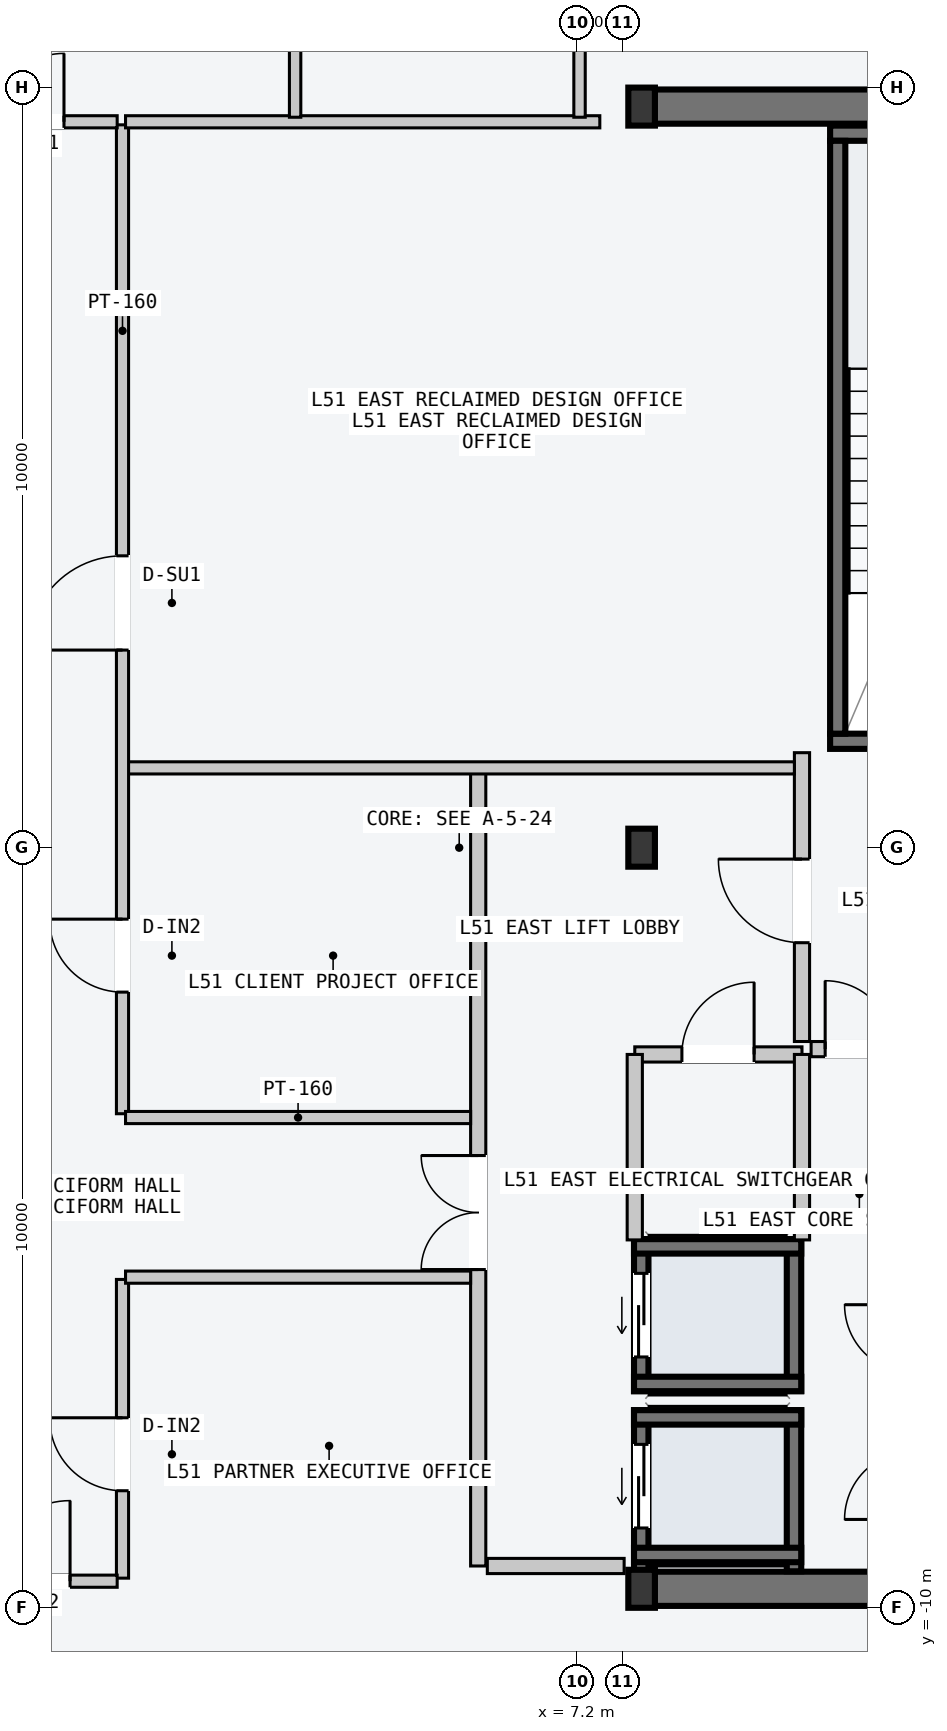
"""IFC4 building model, lengths in metres.
Left out: names, types, materials, properties, quantities, classifications, styles, units other than length and angle.
Written with IfcOpenShell. Run it as: python <this file> out.ifc"""

import sys

from ifc_helpers import new_model, si_unit, direction, frame, frame_2d, origin, origin_2d, place, context, subcontext, project, spatial, rectangle, i_section, extrude, element, fill, save


model = new_model("IFC4")
c1 = context("Model", 3, precision=1e-05, world=origin(), true_north=direction((0.0, 1.0)))
c2 = subcontext(c1, "Body", "Model", "MODEL_VIEW")
j1 = project(units=[si_unit("LENGTHUNIT", "METRE"), si_unit("PLANEANGLEUNIT", "RADIAN")], contexts=[c1])
p1 = place(None, origin())
s1 = spatial("IfcSite", under=j1, at=p1, CompositionType="ELEMENT")
p2 = place(p1, origin())
s2 = spatial("IfcBuilding", under=s1, at=p2, CompositionType="ELEMENT")
p3 = place(p2, frame((0.0, 0.0, 194.7)))
s3 = spatial("IfcBuildingStorey", under=s2, at=p3, CompositionType="ELEMENT", Elevation=194.7)
for number, where, z_axis, x_axis in (
    (1, (8.07, -9.75, -0.2), (0.0, 0.0, 1.0), (1.0, 0.0, 0.0)),
    (2, (8.07, 9.75, -0.2), (0.0, 0.0, 1.0), (1.0, 0.0, 0.0)),
):
    element("IfcWall", number, at=place(p3, frame(where, z_axis=z_axis, x_axis=x_axis)), inside=s3, PredefinedType="SHEAR", context=c2, shape_type="SweptSolid", body=[
        extrude(rectangle(XDim=6.46, YDim=0.45, at=frame_2d((3.23, 0.0))), origin(), (0.0, 0.0, 1.0), 3.6),
    ])
p4 = place(p3, frame((10.53, 1.4, -0.2), z_axis=(0.0, 0.0, 1.0), x_axis=(1.0, 0.0, 0.0)))
e3 = element("IfcWall", 3, at=p4, inside=s3, PredefinedType="SOLIDWALL", context=c2, shape_type="SweptSolid", body=[
    extrude(rectangle(XDim=3.72, YDim=0.2, at=frame_2d((1.86, 0.0))), origin(), (0.0, 0.0, 1.0), 3.6),
])
p5 = place(p4, frame((1.5, 0.0, 0.2)))
e4 = element("IfcOpeningElement", 4, at=p5, cuts=e3, PredefinedType="OPENING", context=c2, shape_type="SweptSolid", body=[
    extrude(rectangle(XDim=1.12, YDim=2.18, at=frame_2d((0.56, 1.09))), frame((0.0, 0.11, 0.0), z_axis=(0.0, -1.0, 0.0), x_axis=(1.0, 0.0, 0.0)), (0.0, 0.0, 1.0), 0.22),
])
p6 = place(p3, frame((10.53, 9.4, -0.2), z_axis=(0.0, 0.0, 1.0), x_axis=(1.0, 0.0, 0.0)))
e5 = element("IfcWall", 5, at=p6, inside=s3, PredefinedType="SOLIDWALL", context=c2, shape_type="SweptSolid", body=[
    extrude(rectangle(XDim=3.72, YDim=0.2, at=frame_2d((1.86, 0.0))), origin(), (0.0, 0.0, 1.0), 3.6),
])
p7 = place(p3, frame((10.63, 1.5, -0.2), z_axis=(0.0, 0.0, 1.0), x_axis=(0.0, 1.0, 0.0)))
e6 = element("IfcWall", 6, at=p7, inside=s3, PredefinedType="SOLIDWALL", context=c2, shape_type="SweptSolid", body=[
    extrude(rectangle(XDim=7.8, YDim=0.2, at=frame_2d((3.9, 0.0))), origin(), (0.0, 0.0, 1.0), 3.6),
])
for number, where, z_axis, x_axis in (
    (7, (8.05, -9.75, 0.0), (0.0, 0.0, 1.0), (1.0, 0.0, 0.0)),
    (8, (8.05, 0.0, 0.0), (0.0, 0.0, 1.0), (1.0, 0.0, 0.0)),
    (9, (8.05, 9.75, 0.0), (0.0, 0.0, 1.0), (1.0, 0.0, 0.0)),
):
    element("IfcColumn", number, at=place(p3, frame(where, z_axis=z_axis, x_axis=x_axis)), inside=s3, PredefinedType="COLUMN", context=c2, shape_type="SweptSolid", body=[
        extrude(i_section(OverallWidth=0.35, OverallDepth=0.5, WebThickness=0.02, FlangeThickness=0.032, at=origin_2d()), origin(), (0.0, 0.0, 1.0), 3.6),
    ])
p8 = place(p3, frame((8.045, -9.52, -0.2), z_axis=(0.0, 0.0, 1.0), x_axis=(0.0, 1.0, 0.0)))
e10 = element("IfcWall", 10, at=p8, inside=s3, PredefinedType="SOLIDWALL", context=c2, shape_type="SweptSolid", body=[
    extrude(rectangle(XDim=2.12, YDim=0.19, at=frame_2d((1.06, 0.0))), origin(), (0.0, 0.0, 1.0), 3.6),
])
p9 = place(p8, frame((0.57, 0.0, 0.2)))
e11 = element("IfcOpeningElement", 11, at=p9, cuts=e10, PredefinedType="OPENING", context=c2, shape_type="SweptSolid", body=[
    extrude(rectangle(XDim=1.1, YDim=2.2, at=frame_2d((0.55, 1.1))), frame((0.0, 0.105, 0.0), z_axis=(0.0, -1.0, 0.0), x_axis=(1.0, 0.0, 0.0)), (0.0, 0.0, 1.0), 0.21),
])
p10 = place(p3, frame((10.055, -9.52, -0.2), z_axis=(0.0, 0.0, 1.0), x_axis=(0.0, 1.0, 0.0)))
e12 = element("IfcWall", 12, at=p10, inside=s3, PredefinedType="SOLIDWALL", context=c2, shape_type="SweptSolid", body=[
    extrude(rectangle(XDim=2.12, YDim=0.19, at=frame_2d((1.06, 0.0))), origin(), (0.0, 0.0, 1.0), 3.6),
])
for number, where, z_axis, x_axis in (
    (13, (7.95, -7.495, -0.2), (0.0, 0.0, 1.0), (1.0, 0.0, 0.0)),
    (14, (7.95, -9.305, -0.2), (0.0, 0.0, 1.0), (1.0, 0.0, 0.0)),
):
    element("IfcWall", number, at=place(p3, frame(where, z_axis=z_axis, x_axis=x_axis)), inside=s3, PredefinedType="SOLIDWALL", context=c2, shape_type="SweptSolid", body=[
        extrude(rectangle(XDim=2.2, YDim=0.19, at=frame_2d((1.1, 0.0))), origin(), (0.0, 0.0, 1.0), 3.6),
    ])
p11 = place(p3, frame((8.045, -7.15, -0.2), z_axis=(0.0, 0.0, 1.0), x_axis=(0.0, 1.0, 0.0)))
e15 = element("IfcWall", 15, at=p11, inside=s3, PredefinedType="SOLIDWALL", context=c2, shape_type="SweptSolid", body=[
    extrude(rectangle(XDim=2.0, YDim=0.19, at=frame_2d((1.0, 0.0))), origin(), (0.0, 0.0, 1.0), 3.6),
])
p12 = place(p11, frame((0.45, 0.0, 0.2)))
e16 = element("IfcOpeningElement", 16, at=p12, cuts=e15, PredefinedType="OPENING", context=c2, shape_type="SweptSolid", body=[
    extrude(rectangle(XDim=1.1, YDim=2.2, at=frame_2d((0.55, 1.1))), frame((0.0, 0.105, 0.0), z_axis=(0.0, -1.0, 0.0), x_axis=(1.0, 0.0, 0.0)), (0.0, 0.0, 1.0), 0.21),
])
p13 = place(p3, frame((10.055, -7.15, -0.2), z_axis=(0.0, 0.0, 1.0), x_axis=(0.0, 1.0, 0.0)))
e17 = element("IfcWall", 17, at=p13, inside=s3, PredefinedType="SOLIDWALL", context=c2, shape_type="SweptSolid", body=[
    extrude(rectangle(XDim=2.0, YDim=0.19, at=frame_2d((1.0, 0.0))), origin(), (0.0, 0.0, 1.0), 3.6),
])
for number, where, z_axis, x_axis in (
    (18, (7.95, -5.245, -0.2), (0.0, 0.0, 1.0), (1.0, 0.0, 0.0)),
    (19, (7.95, -7.055, -0.2), (0.0, 0.0, 1.0), (1.0, 0.0, 0.0)),
):
    element("IfcWall", number, at=place(p3, frame(where, z_axis=z_axis, x_axis=x_axis)), inside=s3, PredefinedType="SOLIDWALL", context=c2, shape_type="SweptSolid", body=[
        extrude(rectangle(XDim=2.2, YDim=0.19, at=frame_2d((1.1, 0.0))), origin(), (0.0, 0.0, 1.0), 3.6),
    ])
p14 = place(p3, frame((5.9, -9.45, 0.0), z_axis=(0.0, 0.0, 1.0), x_axis=(0.0, 1.0, 0.0)))
e20 = element("IfcWall", 20, at=p14, inside=s3, PredefinedType="PARTITIONING", context=c2, shape_type="SweptSolid", body=[
    extrude(rectangle(XDim=10.5, YDim=0.2, at=frame_2d((5.25, 0.0))), origin(), (0.0, 0.0, 1.0), 3.4),
])
p15 = place(p14, frame((3.9, 0.0, 0.0)))
e21 = element("IfcOpeningElement", 21, at=p15, cuts=e20, PredefinedType="OPENING", context=c2, shape_type="SweptSolid", body=[
    extrude(rectangle(XDim=1.5, YDim=2.2, at=frame_2d((0.75, 1.1))), frame((0.0, 0.11, 0.0), z_axis=(0.0, -1.0, 0.0), x_axis=(1.0, 0.0, 0.0)), (0.0, 0.0, 1.0), 0.22),
])
p16 = place(p3, frame((6.02, -9.45, 0.0), z_axis=(0.0, 0.0, 1.0), x_axis=(1.0, 0.0, 0.0)))
e22 = element("IfcWall", 22, at=p16, inside=s3, PredefinedType="PARTITIONING", context=c2, shape_type="SweptSolid", body=[
    extrude(rectangle(XDim=1.8, YDim=0.2, at=frame_2d((0.9, 0.0))), origin(), (0.0, 0.0, 1.0), 3.4),
])
p17 = place(p3, frame((10.16, -2.55, 0.0), z_axis=(0.0, 0.0, 1.0), x_axis=(0.0, 1.0, 0.0)))
e23 = element("IfcWall", 23, at=p17, inside=s3, PredefinedType="PARTITIONING", context=c2, shape_type="SweptSolid", body=[
    extrude(rectangle(XDim=3.8, YDim=0.2, at=frame_2d((1.9, 0.0))), origin(), (0.0, 0.0, 1.0), 3.4),
])
p18 = place(p17, frame((1.3, 0.0, 0.0)))
e24 = element("IfcOpeningElement", 24, at=p18, cuts=e23, PredefinedType="OPENING", context=c2, shape_type="SweptSolid", body=[
    extrude(rectangle(XDim=1.1, YDim=2.15, at=frame_2d((0.55, 1.075))), frame((0.0, 0.11, 0.0), z_axis=(0.0, -1.0, 0.0), x_axis=(1.0, 0.0, 0.0)), (0.0, 0.0, 1.0), 0.22),
])
p19 = place(p3, frame((10.28, -2.65, 0.0), z_axis=(0.0, 0.0, 1.0), x_axis=(1.0, 0.0, 0.0)))
e25 = element("IfcWall", 25, at=p19, inside=s3, PredefinedType="PARTITIONING", context=c2, shape_type="SweptSolid", body=[
    extrude(rectangle(XDim=1.27, YDim=0.2, at=frame_2d((0.635, 0.0))), origin(), (0.0, 0.0, 1.0), 3.4),
])
p20 = place(p19, frame((0.185, 0.0, 0.0)))
e26 = element("IfcOpeningElement", 26, at=p20, cuts=e25, PredefinedType="OPENING", context=c2, shape_type="SweptSolid", body=[
    extrude(rectangle(XDim=0.9, YDim=2.15, at=frame_2d((0.45, 1.075))), frame((0.0, 0.11, 0.0), z_axis=(0.0, -1.0, 0.0), x_axis=(1.0, 0.0, 0.0)), (0.0, 0.0, 1.0), 0.22),
])
p21 = place(p3, frame((7.96, -2.72, 0.0), z_axis=(0.0, 0.0, 1.0), x_axis=(1.0, 0.0, 0.0)))
e27 = element("IfcWall", 27, at=p21, inside=s3, PredefinedType="PARTITIONING", context=c2, shape_type="SweptSolid", body=[
    extrude(rectangle(XDim=2.2, YDim=0.2, at=frame_2d((1.1, 0.0))), origin(), (0.0, 0.0, 1.0), 3.4),
])
p22 = place(p21, frame((0.62, 0.0, 0.0)))
e28 = element("IfcOpeningElement", 28, at=p22, cuts=e27, PredefinedType="OPENING", context=c2, shape_type="SweptSolid", body=[
    extrude(rectangle(XDim=0.95, YDim=2.1, at=frame_2d((0.475, 1.05))), frame((0.0, 0.11, 0.0), z_axis=(0.0, -1.0, 0.0), x_axis=(1.0, 0.0, 0.0)), (0.0, 0.0, 1.0), 0.22),
])
for number, where, z_axis, x_axis in (
    (29, (7.96, -5.16, 0.0), (0.0, 0.0, 1.0), (0.0, 1.0, 0.0)),
    (30, (10.16, -5.16, 0.0), (0.0, 0.0, 1.0), (0.0, 1.0, 0.0)),
):
    element("IfcWall", number, at=place(p3, frame(where, z_axis=z_axis, x_axis=x_axis)), inside=s3, PredefinedType="PARTITIONING", context=c2, shape_type="SweptSolid", body=[
        extrude(rectangle(XDim=2.44, YDim=0.2, at=frame_2d((1.22, 0.0))), origin(), (0.0, 0.0, 1.0), 3.4),
    ])
p23 = place(p3, frame((1.26, 1.05, 0.0), z_axis=(0.0, 0.0, 1.0), x_axis=(1.0, 0.0, 0.0)))
e31 = element("IfcWall", 31, at=p23, inside=s3, PredefinedType="PARTITIONING", context=c2, shape_type="SweptSolid", body=[
    extrude(rectangle(XDim=8.8, YDim=0.16, at=frame_2d((4.4, 0.0))), origin(), (0.0, 0.0, 1.0), 3.4),
])
p24 = place(p3, frame((1.22, -3.5, 0.0), z_axis=(0.0, 0.0, 1.0), x_axis=(0.0, 1.0, 0.0)))
e32 = element("IfcWall", 32, at=p24, inside=s3, PredefinedType="PARTITIONING", context=c2, shape_type="SweptSolid", body=[
    extrude(rectangle(XDim=13.01, YDim=0.16, at=frame_2d((6.505, 0.0))), origin(), (0.0, 0.0, 1.0), 3.4),
])
p25 = place(p24, frame((6.1, 0.0, 0.0)))
e33 = element("IfcOpeningElement", 33, at=p25, cuts=e32, PredefinedType="OPENING", context=c2, shape_type="SweptSolid", body=[
    extrude(rectangle(XDim=1.24, YDim=2.24, at=frame_2d((0.62, 1.12))), frame((0.0, 0.09, 0.0), z_axis=(0.0, -1.0, 0.0), x_axis=(1.0, 0.0, 0.0)), (0.0, 0.0, 1.0), 0.18),
])
p26 = place(p24, frame((1.6, 0.0, 0.0)))
e34 = element("IfcOpeningElement", 34, at=p26, cuts=e32, PredefinedType="OPENING", context=c2, shape_type="SweptSolid", body=[
    extrude(rectangle(XDim=0.96, YDim=2.18, at=frame_2d((0.48, 1.09))), frame((0.0, 0.09, 0.0), z_axis=(0.0, -1.0, 0.0), x_axis=(1.0, 0.0, 0.0)), (0.0, 0.0, 1.0), 0.18),
])
p27 = place(p3, frame((1.26, 9.55, 0.0), z_axis=(0.0, 0.0, 1.0), x_axis=(1.0, 0.0, 0.0)))
e35 = element("IfcWall", 35, at=p27, inside=s3, PredefinedType="PARTITIONING", context=c2, shape_type="SweptSolid", body=[
    extrude(rectangle(XDim=6.24, YDim=0.16, at=frame_2d((3.12, 0.0))), origin(), (0.0, 0.0, 1.0), 3.4),
])
p28 = place(p3, frame((1.26, -3.55, 0.0), z_axis=(0.0, 0.0, 1.0), x_axis=(1.0, 0.0, 0.0)))
e36 = element("IfcWall", 36, at=p28, inside=s3, PredefinedType="PARTITIONING", context=c2, shape_type="SweptSolid", body=[
    extrude(rectangle(XDim=4.54, YDim=0.16, at=frame_2d((2.27, 0.0))), origin(), (0.0, 0.0, 1.0), 3.4),
])
p29 = place(p3, frame((1.22, -9.61, 0.0), z_axis=(0.0, 0.0, 1.0), x_axis=(0.0, 1.0, 0.0)))
e37 = element("IfcWall", 37, at=p29, inside=s3, PredefinedType="PARTITIONING", context=c2, shape_type="SweptSolid", body=[
    extrude(rectangle(XDim=3.93, YDim=0.16, at=frame_2d((1.965, 0.0))), origin(), (0.0, 0.0, 1.0), 3.4),
])
p30 = place(p29, frame((1.15, 0.0, 0.0)))
e38 = element("IfcOpeningElement", 38, at=p30, cuts=e37, PredefinedType="OPENING", context=c2, shape_type="SweptSolid", body=[
    extrude(rectangle(XDim=0.96, YDim=2.18, at=frame_2d((0.48, 1.09))), frame((0.0, 0.09, 0.0), z_axis=(0.0, -1.0, 0.0), x_axis=(1.0, 0.0, 0.0)), (0.0, 0.0, 1.0), 0.18),
])
p31 = place(p3, frame((1.26, -5.65, 0.0), z_axis=(0.0, 0.0, 1.0), x_axis=(1.0, 0.0, 0.0)))
e39 = element("IfcWall", 39, at=p31, inside=s3, PredefinedType="PARTITIONING", context=c2, shape_type="SweptSolid", body=[
    extrude(rectangle(XDim=4.54, YDim=0.16, at=frame_2d((2.27, 0.0))), origin(), (0.0, 0.0, 1.0), 3.4),
])
p32 = place(p3, frame((3.491, 9.61, 0.0), z_axis=(0.0, 0.0, 1.0), x_axis=(0.0, 1.0, 0.0)))
e40 = element("IfcWall", 40, at=p32, inside=s3, PredefinedType="PARTITIONING", context=c2, shape_type="SweptSolid", body=[
    extrude(rectangle(XDim=8.95, YDim=0.15, at=frame_2d((4.475, 0.0))), origin(), (0.0, 0.0, 1.0), 3.4),
])
p33 = place(p32, frame((1.15, 0.0, 0.0)))
e41 = element("IfcOpeningElement", 41, at=p33, cuts=e40, PredefinedType="OPENING", context=c2, shape_type="SweptSolid", body=[
    extrude(rectangle(XDim=0.96, YDim=2.18, at=frame_2d((0.48, 1.09))), frame((0.0, 0.085, 0.0), z_axis=(0.0, -1.0, 0.0), x_axis=(1.0, 0.0, 0.0)), (0.0, 0.0, 1.0), 0.17),
])
p34 = place(p3, frame((7.233, 9.61, 0.0), z_axis=(0.0, 0.0, 1.0), x_axis=(0.0, 1.0, 0.0)))
e42 = element("IfcWall", 42, at=p34, inside=s3, PredefinedType="PARTITIONING", context=c2, shape_type="SweptSolid", body=[
    extrude(rectangle(XDim=8.95, YDim=0.15, at=frame_2d((4.475, 0.0))), origin(), (0.0, 0.0, 1.0), 3.4),
])
p35 = place(p34, frame((1.34, 0.0, 0.0)))
e43 = element("IfcOpeningElement", 43, at=p35, cuts=e42, PredefinedType="OPENING", context=c2, shape_type="SweptSolid", body=[
    extrude(rectangle(XDim=0.96, YDim=2.18, at=frame_2d((0.48, 1.09))), frame((0.0, 0.085, 0.0), z_axis=(0.0, -1.0, 0.0), x_axis=(1.0, 0.0, 0.0)), (0.0, 0.0, 1.0), 0.17),
])
p36 = place(p3, frame((-1.15, 9.55, 0.0), z_axis=(0.0, 0.0, 1.0), x_axis=(1.0, 0.0, 0.0)))
e44 = element("IfcWall", 44, at=p36, inside=s3, PredefinedType="PARTITIONING", context=c2, shape_type="SweptSolid", body=[
    extrude(rectangle(XDim=2.3, YDim=0.16, at=frame_2d((1.15, 0.0))), origin(), (0.0, 0.0, 1.0), 3.4),
])
p37 = place(p36, frame((0.7, 0.0, 0.0)))
e45 = element("IfcOpeningElement", 45, at=p37, cuts=e44, PredefinedType="OPENING", context=c2, shape_type="SweptSolid", body=[
    extrude(rectangle(XDim=0.9, YDim=2.15, at=frame_2d((0.45, 1.075))), frame((0.0, 0.09, 0.0), z_axis=(0.0, -1.0, 0.0), x_axis=(1.0, 0.0, 0.0)), (0.0, 0.0, 1.0), 0.18),
])
p38 = place(p3, frame((-1.15, -9.65, 0.0), z_axis=(0.0, 0.0, 1.0), x_axis=(1.0, 0.0, 0.0)))
e46 = element("IfcWall", 46, at=p38, inside=s3, PredefinedType="PARTITIONING", context=c2, shape_type="SweptSolid", body=[
    extrude(rectangle(XDim=2.3, YDim=0.16, at=frame_2d((1.15, 0.0))), origin(), (0.0, 0.0, 1.0), 2.75),
])
p39 = place(p38, frame((0.62, 0.0, 0.0)))
e47 = element("IfcOpeningElement", 47, at=p39, cuts=e46, PredefinedType="OPENING", context=c2, shape_type="SweptSolid", body=[
    extrude(rectangle(XDim=1.06, YDim=2.2, at=frame_2d((0.53, 1.1))), frame((0.0, 0.09, 0.0), z_axis=(0.0, -1.0, 0.0), x_axis=(1.0, 0.0, 0.0)), (0.0, 0.0, 1.0), 0.18),
])
p40 = place(p9, origin())
e48 = element("IfcDoor", 48, at=p40, inside=s3, OperationType="SLIDING_TO_LEFT", PredefinedType="DOOR", context=c2, shape_type="SweptSolid", body=[
    extrude(rectangle(XDim=1.1, YDim=2.2, at=frame_2d((0.55, 1.1))), frame((0.0, 0.025, 0.0), z_axis=(0.0, -1.0, 0.0), x_axis=(1.0, 0.0, 0.0)), (0.0, 0.0, 1.0), 0.05),
])
fill(e11, e48)
p41 = place(p12, origin())
e49 = element("IfcDoor", 49, at=p41, inside=s3, OperationType="SLIDING_TO_LEFT", PredefinedType="DOOR", context=c2, shape_type="SweptSolid", body=[
    extrude(rectangle(XDim=1.1, YDim=2.2, at=frame_2d((0.55, 1.1))), frame((0.0, 0.025, 0.0), z_axis=(0.0, -1.0, 0.0), x_axis=(1.0, 0.0, 0.0)), (0.0, 0.0, 1.0), 0.05),
])
fill(e16, e49)
p42 = place(p15, origin())
e50 = element("IfcDoor", 50, at=p42, inside=s3, OperationType="DOUBLE_DOOR_SINGLE_SWING", PredefinedType="DOOR", context=c2, shape_type="SweptSolid", body=[
    extrude(rectangle(XDim=1.5, YDim=2.2, at=frame_2d((0.75, 1.1))), frame((0.0, 0.025, 0.0), z_axis=(0.0, -1.0, 0.0), x_axis=(1.0, 0.0, 0.0)), (0.0, 0.0, 1.0), 0.05),
])
fill(e21, e50)
p43 = place(p18, origin())
e51 = element("IfcDoor", 51, at=p43, inside=s3, OperationType="SINGLE_SWING_RIGHT", PredefinedType="DOOR", context=c2, shape_type="SweptSolid", body=[
    extrude(rectangle(XDim=1.1, YDim=2.15, at=frame_2d((0.55, 1.075))), frame((0.0, 0.025, 0.0), z_axis=(0.0, -1.0, 0.0), x_axis=(1.0, 0.0, 0.0)), (0.0, 0.0, 1.0), 0.05),
])
fill(e24, e51)
p44 = place(p20, origin())
e52 = element("IfcDoor", 52, at=p44, inside=s3, OperationType="SINGLE_SWING_LEFT", PredefinedType="DOOR", context=c2, shape_type="SweptSolid", body=[
    extrude(rectangle(XDim=0.9, YDim=2.15, at=frame_2d((0.45, 1.075))), frame((0.0, 0.025, 0.0), z_axis=(0.0, -1.0, 0.0), x_axis=(1.0, 0.0, 0.0)), (0.0, 0.0, 1.0), 0.05),
])
fill(e26, e52)
p45 = place(p22, origin())
e53 = element("IfcDoor", 53, at=p45, inside=s3, OperationType="SINGLE_SWING_RIGHT", PredefinedType="DOOR", context=c2, shape_type="SweptSolid", body=[
    extrude(rectangle(XDim=0.95, YDim=2.1, at=frame_2d((0.475, 1.05))), frame((0.0, 0.025, 0.0), z_axis=(0.0, -1.0, 0.0), x_axis=(1.0, 0.0, 0.0)), (0.0, 0.0, 1.0), 0.05),
])
fill(e28, e53)
p46 = place(p25, origin())
e54 = element("IfcDoor", 54, at=p46, inside=s3, OperationType="SINGLE_SWING_LEFT", PredefinedType="DOOR", context=c2, shape_type="SweptSolid", body=[
    extrude(rectangle(XDim=1.24, YDim=2.24, at=frame_2d((0.62, 1.12))), frame((0.0, 0.025, 0.0), z_axis=(0.0, -1.0, 0.0), x_axis=(1.0, 0.0, 0.0)), (0.0, 0.0, 1.0), 0.05),
])
fill(e33, e54)
p47 = place(p26, origin())
e55 = element("IfcDoor", 55, at=p47, inside=s3, OperationType="SINGLE_SWING_RIGHT", PredefinedType="DOOR", context=c2, shape_type="SweptSolid", body=[
    extrude(rectangle(XDim=0.96, YDim=2.18, at=frame_2d((0.48, 1.09))), frame((0.0, 0.025, 0.0), z_axis=(0.0, -1.0, 0.0), x_axis=(1.0, 0.0, 0.0)), (0.0, 0.0, 1.0), 0.05),
])
fill(e34, e55)
p48 = place(p30, origin())
e56 = element("IfcDoor", 56, at=p48, inside=s3, OperationType="SINGLE_SWING_RIGHT", PredefinedType="DOOR", context=c2, shape_type="SweptSolid", body=[
    extrude(rectangle(XDim=0.96, YDim=2.18, at=frame_2d((0.48, 1.09))), frame((0.0, 0.025, 0.0), z_axis=(0.0, -1.0, 0.0), x_axis=(1.0, 0.0, 0.0)), (0.0, 0.0, 1.0), 0.05),
])
fill(e38, e56)
p49 = place(p37, origin())
e57 = element("IfcDoor", 57, at=p49, inside=s3, OperationType="SINGLE_SWING_RIGHT", PredefinedType="DOOR", context=c2, shape_type="SweptSolid", body=[
    extrude(rectangle(XDim=0.9, YDim=2.15, at=frame_2d((0.45, 1.075))), frame((0.0, 0.025, 0.0), z_axis=(0.0, -1.0, 0.0), x_axis=(1.0, 0.0, 0.0)), (0.0, 0.0, 1.0), 0.05),
])
fill(e45, e57)
p50 = place(p39, origin())
e58 = element("IfcDoor", 58, at=p50, inside=s3, OperationType="SINGLE_SWING_RIGHT", PredefinedType="DOOR", context=c2, shape_type="SweptSolid", body=[
    extrude(rectangle(XDim=1.06, YDim=2.2, at=frame_2d((0.53, 1.1))), frame((0.0, 0.025, 0.0), z_axis=(0.0, -1.0, 0.0), x_axis=(1.0, 0.0, 0.0)), (0.0, 0.0, 1.0), 0.05),
])
fill(e47, e58)
save(model, sys.argv[1])
